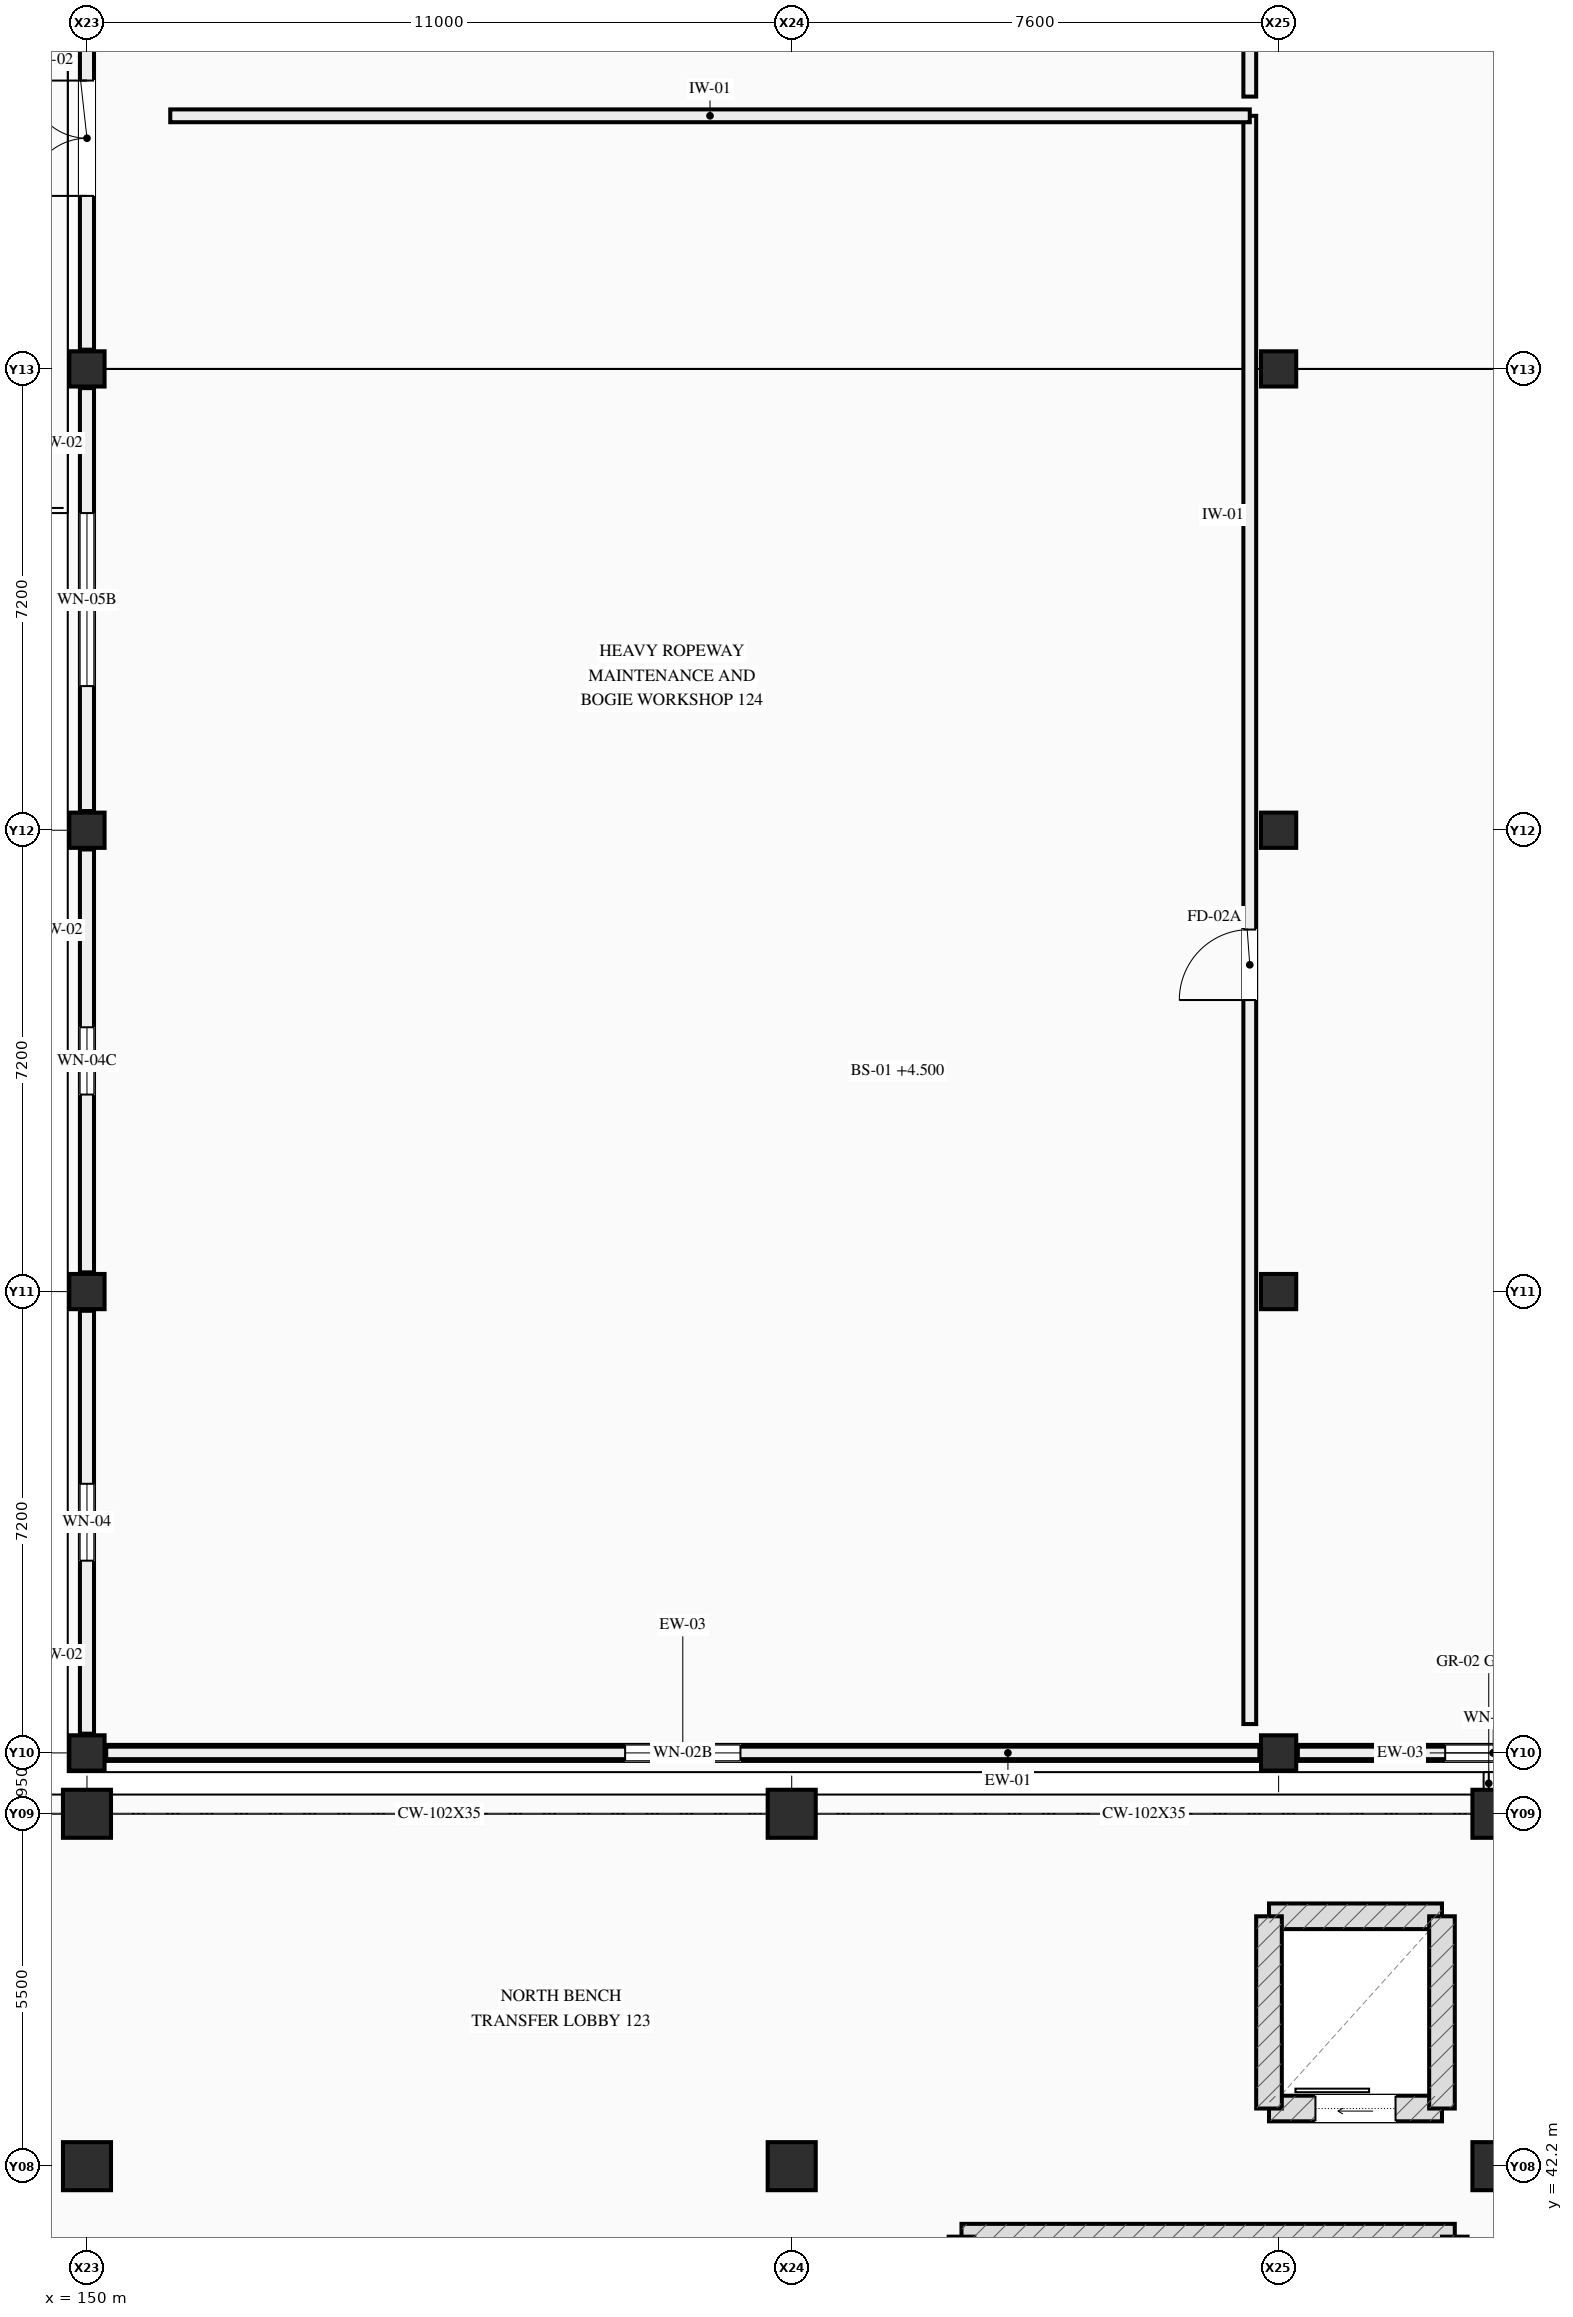
"""IFC4 building model, lengths in metres.
Left out: names, types, materials, properties, quantities, classifications, styles, units other than length and angle.
Written with IfcOpenShell. Run it as: python <this file> out.ifc"""

import sys

from ifc_helpers import new_model, si_unit, direction, frame, frame_2d, origin, origin_2d, place, context, subcontext, project, spatial, rectangle, extrude, element, fill, save


model = new_model("IFC4")
c1 = context("Model", 3, precision=1e-05, world=origin(), true_north=direction((0.0, 1.0)))
c2 = subcontext(c1, "Body", "Model", "MODEL_VIEW")
j1 = project(units=[si_unit("LENGTHUNIT", "METRE"), si_unit("PLANEANGLEUNIT", "RADIAN")], contexts=[c1])
p1 = place(None, origin())
s1 = spatial("IfcSite", under=j1, at=p1, CompositionType="ELEMENT")
p2 = place(p1, origin())
s2 = spatial("IfcBuilding", under=s1, at=p2, CompositionType="ELEMENT")
p3 = place(p2, frame((0.0, 0.0, 4.5)))
s3 = spatial("IfcBuildingStorey", under=s2, at=p3, CompositionType="ELEMENT", Elevation=4.5)
for number, where, z_axis, x_axis in (
    (1, (150.0, 42.2, 0.0), (0.0, 0.0, 1.0), (1.0, 0.0, 0.0)),
    (2, (150.0, 47.7, 0.0), (0.0, 0.0, 1.0), (1.0, 0.0, 0.0)),
    (3, (161.0, 42.2, 0.0), (0.0, 0.0, 1.0), (1.0, 0.0, 0.0)),
    (4, (161.0, 47.7, 0.0), (0.0, 0.0, 1.0), (1.0, 0.0, 0.0)),
    (5, (172.0, 42.2, 0.0), (0.0, 0.0, 1.0), (1.0, 0.0, 0.0)),
    (6, (172.0, 47.7, 0.0), (0.0, 0.0, 1.0), (1.0, 0.0, 0.0)),
):
    element("IfcColumn", number, at=place(p3, frame(where, z_axis=z_axis, x_axis=x_axis)), inside=s3, PredefinedType="COLUMN", context=c2, shape_type="SweptSolid", body=[
        extrude(rectangle(XDim=0.75, YDim=0.75, at=origin_2d()), origin(), (0.0, 0.0, 1.0), 4.5),
    ])
for number, where, z_axis, x_axis in (
    (7, (150.0, 48.65, 0.0), (0.0, 0.0, 1.0), (1.0, 0.0, 0.0)),
    (8, (150.0, 55.85, 0.0), (0.0, 0.0, 1.0), (1.0, 0.0, 0.0)),
    (9, (150.0, 63.05, 0.0), (0.0, 0.0, 1.0), (1.0, 0.0, 0.0)),
    (10, (150.0, 70.25, 0.0), (0.0, 0.0, 1.0), (1.0, 0.0, 0.0)),
    (11, (168.6, 48.65, 0.0), (0.0, 0.0, 1.0), (1.0, 0.0, 0.0)),
    (12, (168.6, 55.85, 0.0), (0.0, 0.0, 1.0), (1.0, 0.0, 0.0)),
    (13, (168.6, 63.05, 0.0), (0.0, 0.0, 1.0), (1.0, 0.0, 0.0)),
    (14, (168.6, 70.25, 0.0), (0.0, 0.0, 1.0), (1.0, 0.0, 0.0)),
):
    element("IfcColumn", number, at=place(p3, frame(where, z_axis=z_axis, x_axis=x_axis)), inside=s3, PredefinedType="COLUMN", context=c2, shape_type="SweptSolid", body=[
        extrude(rectangle(XDim=0.55, YDim=0.55, at=origin_2d()), origin(), (0.0, 0.0, 1.0), 4.5),
    ])
p4 = place(p3, frame((168.3, 48.65, 0.0), z_axis=(0.0, 0.0, 1.0), x_axis=(-1.0, 0.0, 0.0)))
e15 = element("IfcWall", 15, at=p4, inside=s3, PredefinedType="STANDARD", context=c2, shape_type="SweptSolid", body=[
    extrude(rectangle(XDim=18.0, YDim=0.25, at=frame_2d((9.0, 0.0))), origin(), (0.0, 0.0, 1.0), 2.985),
])
p5 = place(p4, frame((8.1, 0.0, 0.95)))
e16 = element("IfcOpeningElement", 16, at=p5, cuts=e15, PredefinedType="OPENING", context=c2, shape_type="SweptSolid", body=[
    extrude(rectangle(XDim=1.8, YDim=1.4, at=frame_2d((0.9, 0.7))), frame((0.0, 0.135, 0.0), z_axis=(0.0, -1.0, 0.0), x_axis=(1.0, 0.0, 0.0)), (0.0, 0.0, 1.0), 0.27),
])
p6 = place(p3, frame((168.3, 48.65, 3.35), z_axis=(0.0, 0.0, 1.0), x_axis=(-1.0, 0.0, 0.0)))
e17 = element("IfcWall", 17, at=p6, inside=s3, PredefinedType="STANDARD", context=c2, shape_type="SweptSolid", body=[
    extrude(rectangle(XDim=18.0, YDim=0.195, at=frame_2d((9.0, 0.0))), origin(), (0.0, 0.0, 1.0), 0.23),
])
p7 = place(p3, frame((175.0, 48.65, 0.0), z_axis=(0.0, 0.0, 1.0), x_axis=(-1.0, 0.0, 0.0)))
e18 = element("IfcWall", 18, at=p7, inside=s3, PredefinedType="STANDARD", context=c2, shape_type="SweptSolid", body=[
    extrude(rectangle(XDim=6.1, YDim=0.25, at=frame_2d((3.05, 0.0))), origin(), (0.0, 0.0, 1.0), 2.985),
])
p8 = place(p7, frame((2.3, 0.0, 1.0)))
e19 = element("IfcOpeningElement", 19, at=p8, cuts=e18, PredefinedType="OPENING", context=c2, shape_type="SweptSolid", body=[
    extrude(rectangle(XDim=1.5, YDim=1.25, at=frame_2d((0.75, 0.625))), frame((0.0, 0.135, 0.0), z_axis=(0.0, -1.0, 0.0), x_axis=(1.0, 0.0, 0.0)), (0.0, 0.0, 1.0), 0.27),
])
p9 = place(p3, frame((175.0, 48.65, 3.35), z_axis=(0.0, 0.0, 1.0), x_axis=(-1.0, 0.0, 0.0)))
e20 = element("IfcWall", 20, at=p9, inside=s3, PredefinedType="STANDARD", context=c2, shape_type="SweptSolid", body=[
    extrude(rectangle(XDim=6.1, YDim=0.195, at=frame_2d((3.05, 0.0))), origin(), (0.0, 0.0, 1.0), 0.23),
])
p10 = place(p3, frame((150.0, 48.95, 0.0), z_axis=(0.0, 0.0, 1.0), x_axis=(0.0, 1.0, 0.0)))
e21 = element("IfcWall", 21, at=p10, inside=s3, PredefinedType="STANDARD", context=c2, shape_type="SweptSolid", body=[
    extrude(rectangle(XDim=6.6, YDim=0.22, at=frame_2d((3.3, 0.0))), origin(), (0.0, 0.0, 1.0), 3.545),
])
p11 = place(p10, frame((2.7, 0.0, 1.0)))
e22 = element("IfcOpeningElement", 22, at=p11, cuts=e21, PredefinedType="OPENING", context=c2, shape_type="SweptSolid", body=[
    extrude(rectangle(XDim=1.2, YDim=1.35, at=frame_2d((0.6, 0.675))), frame((0.0, 0.12, 0.0), z_axis=(0.0, -1.0, 0.0), x_axis=(1.0, 0.0, 0.0)), (0.0, 0.0, 1.0), 0.24),
])
p12 = place(p3, frame((150.0, 56.15, 0.0), z_axis=(0.0, 0.0, 1.0), x_axis=(0.0, 1.0, 0.0)))
e23 = element("IfcWall", 23, at=p12, inside=s3, PredefinedType="STANDARD", context=c2, shape_type="SweptSolid", body=[
    extrude(rectangle(XDim=6.6, YDim=0.22, at=frame_2d((3.3, 0.0))), origin(), (0.0, 0.0, 1.0), 3.545),
])
p13 = place(p12, frame((2.775, 0.0, 1.02)))
e24 = element("IfcOpeningElement", 24, at=p13, cuts=e23, PredefinedType="OPENING", context=c2, shape_type="SweptSolid", body=[
    extrude(rectangle(XDim=1.05, YDim=1.2, at=frame_2d((0.525, 0.6))), frame((0.0, 0.12, 0.0), z_axis=(0.0, -1.0, 0.0), x_axis=(1.0, 0.0, 0.0)), (0.0, 0.0, 1.0), 0.24),
])
p14 = place(p3, frame((150.0, 63.35, 0.0), z_axis=(0.0, 0.0, 1.0), x_axis=(0.0, 1.0, 0.0)))
e25 = element("IfcWall", 25, at=p14, inside=s3, PredefinedType="STANDARD", context=c2, shape_type="SweptSolid", body=[
    extrude(rectangle(XDim=6.6, YDim=0.22, at=frame_2d((3.3, 0.0))), origin(), (0.0, 0.0, 1.0), 3.545),
])
p15 = place(p14, frame((1.95, 0.0, 0.88)))
e26 = element("IfcOpeningElement", 26, at=p15, cuts=e25, PredefinedType="OPENING", context=c2, shape_type="SweptSolid", body=[
    extrude(rectangle(XDim=2.7, YDim=1.45, at=frame_2d((1.35, 0.725))), frame((0.0, 0.12, 0.0), z_axis=(0.0, -1.0, 0.0), x_axis=(1.0, 0.0, 0.0)), (0.0, 0.0, 1.0), 0.24),
])
p16 = place(p3, frame((150.0, 70.55, 0.0), z_axis=(0.0, 0.0, 1.0), x_axis=(0.0, 1.0, 0.0)))
e27 = element("IfcWall", 27, at=p16, inside=s3, PredefinedType="STANDARD", context=c2, shape_type="SweptSolid", body=[
    extrude(rectangle(XDim=6.6, YDim=0.22, at=frame_2d((3.3, 0.0))), origin(), (0.0, 0.0, 1.0), 3.545),
])
p17 = place(p16, frame((2.4, 0.0, 0.0)))
e28 = element("IfcOpeningElement", 28, at=p17, cuts=e27, PredefinedType="OPENING", context=c2, shape_type="SweptSolid", body=[
    extrude(rectangle(XDim=1.8, YDim=2.25, at=frame_2d((0.9, 1.125))), frame((0.0, 0.12, 0.0), z_axis=(0.0, -1.0, 0.0), x_axis=(1.0, 0.0, 0.0)), (0.0, 0.0, 1.0), 0.24),
])
p18 = place(p3, frame((171.35, 41.1, 0.0), z_axis=(0.0, 0.0, 1.0), x_axis=(-1.0, 0.0, 0.0)))
e29 = element("IfcWall", 29, at=p18, inside=s3, PredefinedType="SHEAR", context=c2, shape_type="SweptSolid", body=[
    extrude(rectangle(XDim=7.7, YDim=0.4, at=frame_2d((3.85, 0.0))), origin(), (0.0, 0.0, 1.0), 4.2),
])
p19 = place(p3, frame((171.35, 37.45, 0.0), z_axis=(0.0, 0.0, 1.0), x_axis=(0.0, 1.0, 0.0)))
e30 = element("IfcWall", 30, at=p19, inside=s3, PredefinedType="SHEAR", context=c2, shape_type="SweptSolid", body=[
    extrude(rectangle(XDim=3.65, YDim=0.4, at=frame_2d((1.825, 0.0))), origin(), (0.0, 0.0, 1.0), 4.2),
])
p20 = place(p3, frame((168.45, 43.1, 0.0), z_axis=(0.0, 0.0, 1.0), x_axis=(1.0, 0.0, 0.0)))
e31 = element("IfcWall", 31, at=p20, inside=s3, PredefinedType="SHEAR", context=c2, shape_type="SweptSolid", body=[
    extrude(rectangle(XDim=2.7, YDim=0.4, at=frame_2d((1.35, 0.0))), origin(), (0.0, 0.0, 1.0), 4.2),
])
p21 = place(p20, frame((0.725, 0.0, 0.0)))
e32 = element("IfcOpeningElement", 32, at=p21, cuts=e31, PredefinedType="OPENING", context=c2, shape_type="SweptSolid", body=[
    extrude(rectangle(XDim=1.25, YDim=2.2, at=frame_2d((0.625, 1.1))), frame((0.0, 0.21, 0.0), z_axis=(0.0, -1.0, 0.0), x_axis=(1.0, 0.0, 0.0)), (0.0, 0.0, 1.0), 0.42),
])
p22 = place(p3, frame((168.45, 46.1, 0.0), z_axis=(0.0, 0.0, 1.0), x_axis=(1.0, 0.0, 0.0)))
e33 = element("IfcWall", 33, at=p22, inside=s3, PredefinedType="SHEAR", context=c2, shape_type="SweptSolid", body=[
    extrude(rectangle(XDim=2.7, YDim=0.4, at=frame_2d((1.35, 0.0))), origin(), (0.0, 0.0, 1.0), 4.2),
])
for number, where, z_axis, x_axis in (
    (34, (168.45, 43.1, 0.0), (0.0, 0.0, 1.0), (0.0, 1.0, 0.0)),
    (35, (171.15, 43.1, 0.0), (0.0, 0.0, 1.0), (0.0, 1.0, 0.0)),
):
    element("IfcWall", number, at=place(p3, frame(where, z_axis=z_axis, x_axis=x_axis)), inside=s3, PredefinedType="SHEAR", context=c2, shape_type="SweptSolid", body=[
        extrude(rectangle(XDim=3.0, YDim=0.4, at=frame_2d((1.5, 0.0))), origin(), (0.0, 0.0, 1.0), 4.2),
    ])
p23 = place(p3, frame((168.15, 49.1, 0.0), z_axis=(0.0, 0.0, 1.0), x_axis=(0.0, 1.0, 0.0)))
e36 = element("IfcWall", 36, at=p23, inside=s3, PredefinedType="SOLIDWALL", context=c2, shape_type="SweptSolid", body=[
    extrude(rectangle(XDim=25.1, YDim=0.2, at=frame_2d((12.55, 0.0))), origin(), (0.0, 0.0, 1.0), 3.3),
])
p24 = place(p23, frame((11.3, 0.0, 0.0)))
e37 = element("IfcOpeningElement", 37, at=p24, cuts=e36, PredefinedType="OPENING", context=c2, shape_type="SweptSolid", body=[
    extrude(rectangle(XDim=1.1, YDim=2.2, at=frame_2d((0.55, 1.1))), frame((0.0, 0.11, 0.0), z_axis=(0.0, -1.0, 0.0), x_axis=(1.0, 0.0, 0.0)), (0.0, 0.0, 1.0), 0.22),
])
p25 = place(p3, frame((151.3, 74.2, 0.0), z_axis=(0.0, 0.0, 1.0), x_axis=(1.0, 0.0, 0.0)))
e38 = element("IfcWall", 38, at=p25, inside=s3, PredefinedType="SOLIDWALL", context=c2, shape_type="SweptSolid", body=[
    extrude(rectangle(XDim=16.85, YDim=0.2, at=frame_2d((8.425, 0.0))), origin(), (0.0, 0.0, 1.0), 3.3),
])
p26 = place(p3, frame((168.15, 74.5, 0.0), z_axis=(0.0, 0.0, 1.0), x_axis=(0.0, 1.0, 0.0)))
e39 = element("IfcWall", 39, at=p26, inside=s3, PredefinedType="SOLIDWALL", context=c2, shape_type="SweptSolid", body=[
    extrude(rectangle(XDim=24.2, YDim=0.2, at=frame_2d((12.1, 0.0))), origin(), (0.0, 0.0, 1.0), 3.3),
])
p27 = place(p26, frame((11.9, 0.0, 0.0)))
e40 = element("IfcOpeningElement", 40, at=p27, cuts=e39, PredefinedType="OPENING", context=c2, shape_type="SweptSolid", body=[
    extrude(rectangle(XDim=1.1, YDim=2.2, at=frame_2d((0.55, 1.1))), frame((0.0, 0.11, 0.0), z_axis=(0.0, -1.0, 0.0), x_axis=(1.0, 0.0, 0.0)), (0.0, 0.0, 1.0), 0.22),
])
p28 = place(p5, origin())
e41 = element("IfcWindow", 41, at=p28, inside=s3, PartitioningType="SINGLE_PANEL", PredefinedType="WINDOW", context=c2, shape_type="SweptSolid", body=[
    extrude(rectangle(XDim=1.8, YDim=1.4, at=frame_2d((0.9, 0.7))), frame((0.0, 0.03, 0.0), z_axis=(0.0, -1.0, 0.0), x_axis=(1.0, 0.0, 0.0)), (0.0, 0.0, 1.0), 0.06),
])
fill(e16, e41)
p29 = place(p8, origin())
e42 = element("IfcWindow", 42, at=p29, inside=s3, PartitioningType="SINGLE_PANEL", PredefinedType="WINDOW", context=c2, shape_type="SweptSolid", body=[
    extrude(rectangle(XDim=1.5, YDim=1.25, at=frame_2d((0.75, 0.625))), frame((0.0, 0.03, 0.0), z_axis=(0.0, -1.0, 0.0), x_axis=(1.0, 0.0, 0.0)), (0.0, 0.0, 1.0), 0.06),
])
fill(e19, e42)
p30 = place(p11, origin())
e43 = element("IfcWindow", 43, at=p30, inside=s3, PartitioningType="SINGLE_PANEL", PredefinedType="WINDOW", context=c2, shape_type="SweptSolid", body=[
    extrude(rectangle(XDim=1.2, YDim=1.35, at=frame_2d((0.6, 0.675))), frame((0.0, 0.03, 0.0), z_axis=(0.0, -1.0, 0.0), x_axis=(1.0, 0.0, 0.0)), (0.0, 0.0, 1.0), 0.06),
])
fill(e22, e43)
p31 = place(p13, origin())
e44 = element("IfcWindow", 44, at=p31, inside=s3, PartitioningType="SINGLE_PANEL", PredefinedType="WINDOW", context=c2, shape_type="SweptSolid", body=[
    extrude(rectangle(XDim=1.05, YDim=1.2, at=frame_2d((0.525, 0.6))), frame((0.0, 0.03, 0.0), z_axis=(0.0, -1.0, 0.0), x_axis=(1.0, 0.0, 0.0)), (0.0, 0.0, 1.0), 0.06),
])
fill(e24, e44)
p32 = place(p15, origin())
e45 = element("IfcWindow", 45, at=p32, inside=s3, PartitioningType="SINGLE_PANEL", PredefinedType="WINDOW", context=c2, shape_type="SweptSolid", body=[
    extrude(rectangle(XDim=2.7, YDim=1.45, at=frame_2d((1.35, 0.725))), frame((0.0, 0.03, 0.0), z_axis=(0.0, -1.0, 0.0), x_axis=(1.0, 0.0, 0.0)), (0.0, 0.0, 1.0), 0.06),
])
fill(e26, e45)
p33 = place(p17, origin())
e46 = element("IfcDoor", 46, at=p33, inside=s3, OperationType="DOUBLE_DOOR_SINGLE_SWING", PredefinedType="DOOR", context=c2, shape_type="SweptSolid", body=[
    extrude(rectangle(XDim=1.8, YDim=2.25, at=frame_2d((0.9, 1.125))), frame((0.0, 0.025, 0.0), z_axis=(0.0, -1.0, 0.0), x_axis=(1.0, 0.0, 0.0)), (0.0, 0.0, 1.0), 0.05),
])
fill(e28, e46)
p34 = place(p21, origin())
e47 = element("IfcDoor", 47, at=p34, inside=s3, OperationType="SLIDING_TO_LEFT", PredefinedType="DOOR", context=c2, shape_type="SweptSolid", body=[
    extrude(rectangle(XDim=1.25, YDim=2.2, at=frame_2d((0.625, 1.1))), frame((0.0, 0.025, 0.0), z_axis=(0.0, -1.0, 0.0), x_axis=(1.0, 0.0, 0.0)), (0.0, 0.0, 1.0), 0.05),
])
fill(e32, e47)
p35 = place(p24, origin())
e48 = element("IfcDoor", 48, at=p35, inside=s3, OperationType="SINGLE_SWING_LEFT", PredefinedType="DOOR", context=c2, shape_type="SweptSolid", body=[
    extrude(rectangle(XDim=1.1, YDim=2.2, at=frame_2d((0.55, 1.1))), frame((0.0, 0.025, 0.0), z_axis=(0.0, -1.0, 0.0), x_axis=(1.0, 0.0, 0.0)), (0.0, 0.0, 1.0), 0.05),
])
fill(e37, e48)
save(model, sys.argv[1])
